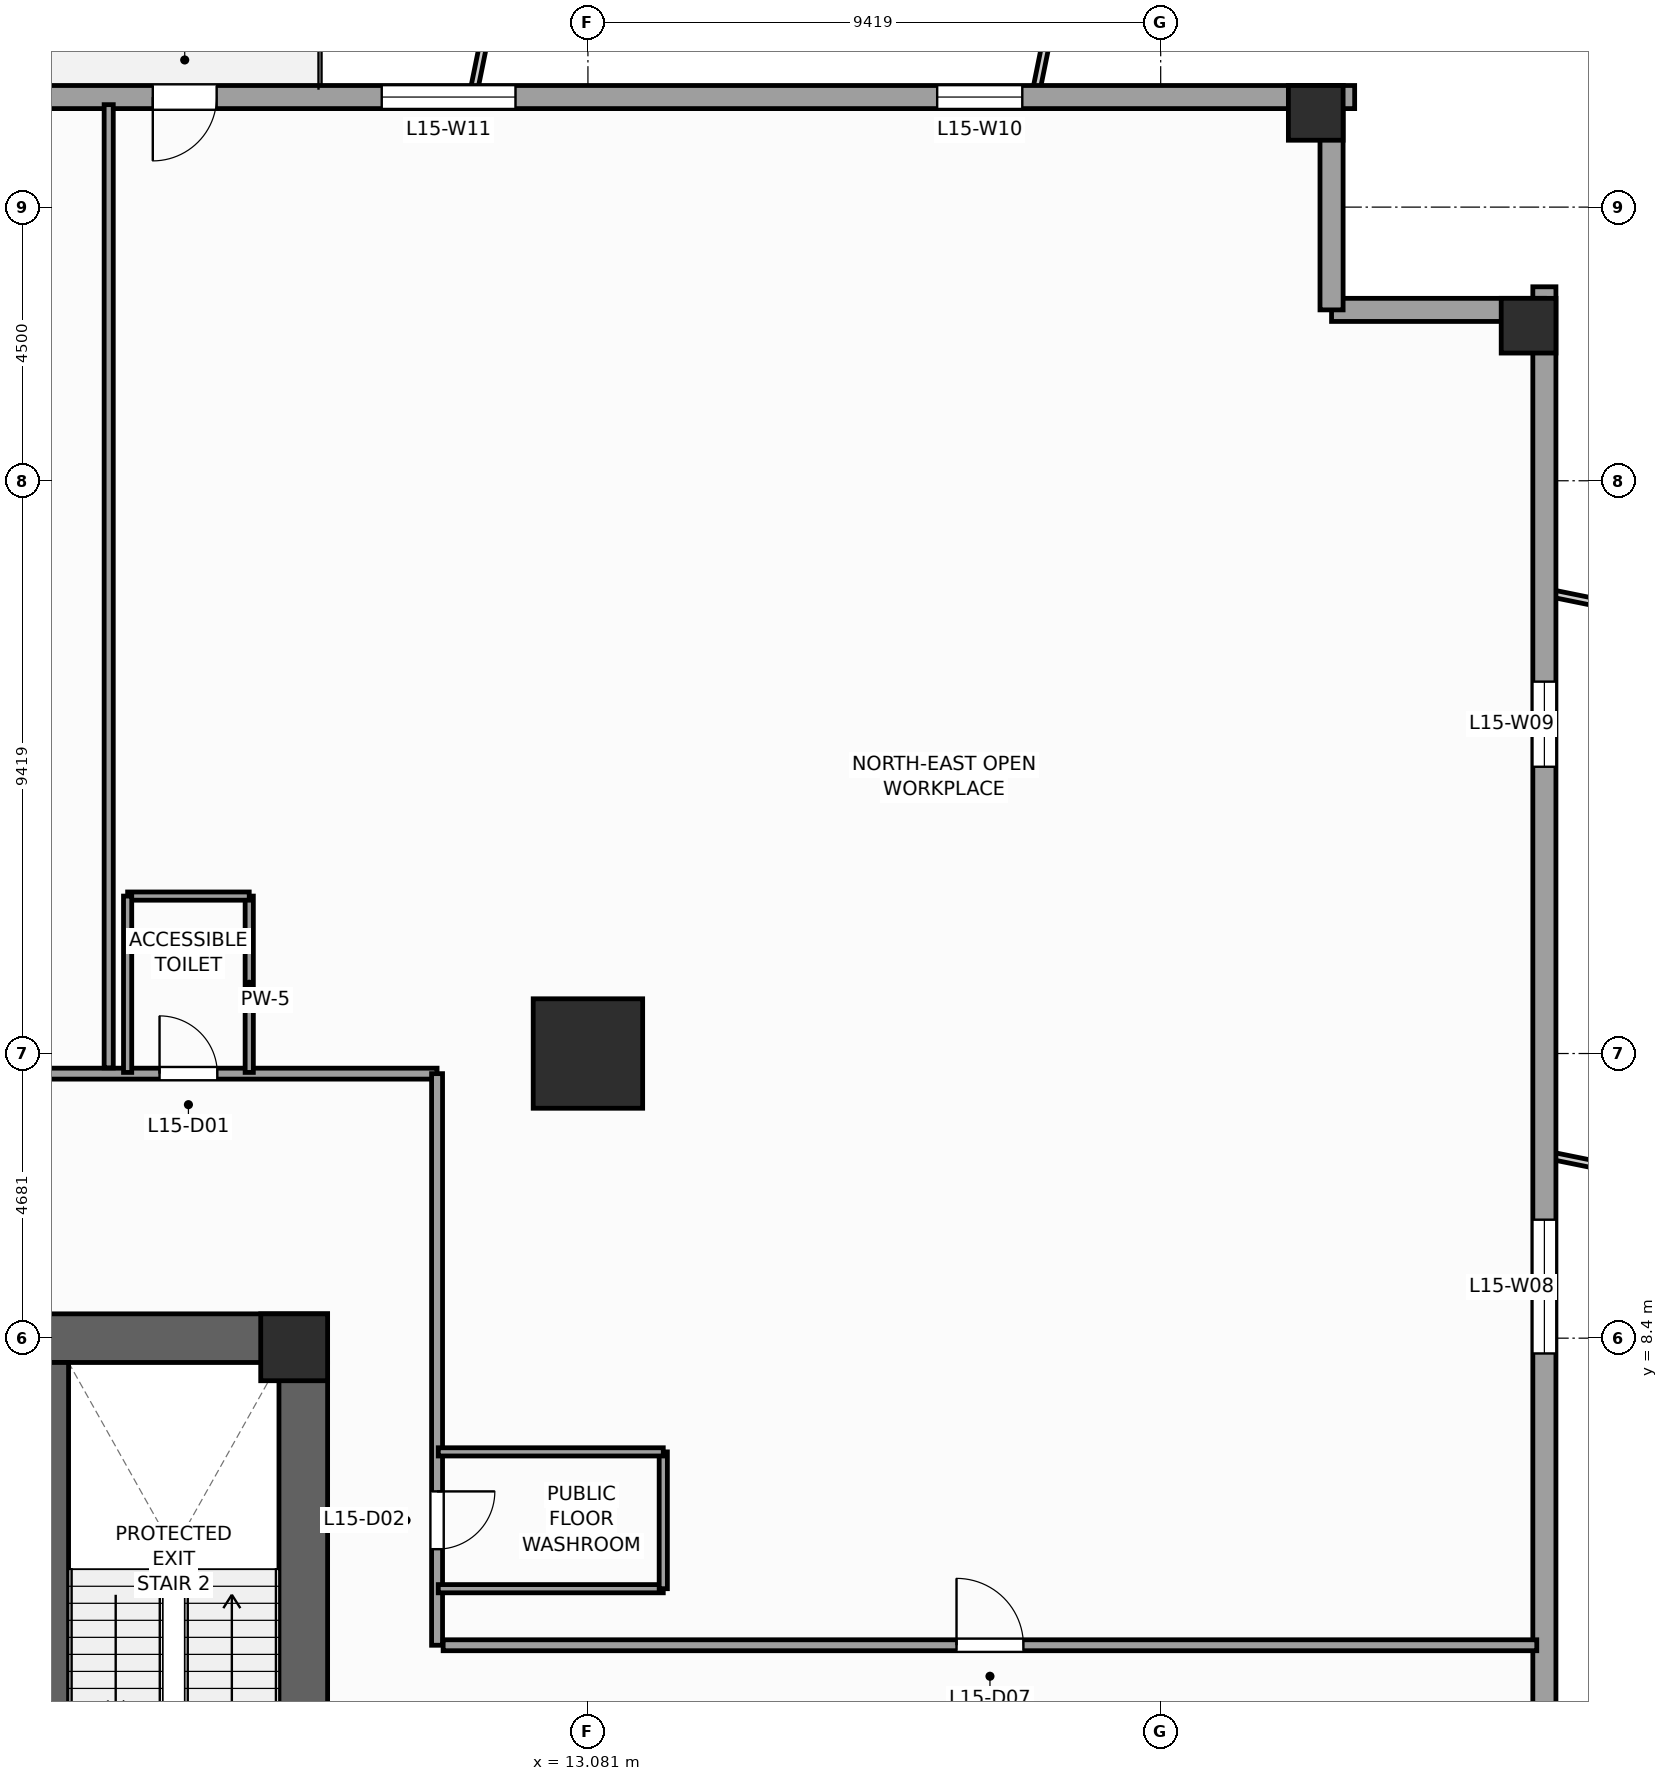
"""IFC4 building model, lengths in metres.
Left out: names, types, materials, properties, quantities, classifications, styles, units other than length and angle.
Written with IfcOpenShell. Run it as: python <this file> out.ifc"""

import sys

from ifc_helpers import new_model, si_unit, direction, frame, frame_2d, origin, origin_2d, place, context, subcontext, project, spatial, rectangle, extrude, source, transform, mapped, element, fill, save


model = new_model("IFC4")
c1 = context("Model", 3, precision=1e-05, world=origin(), true_north=direction((0.0, 1.0)))
c2 = subcontext(c1, "Body", "Model", "MODEL_VIEW")
j1 = project(units=[si_unit("LENGTHUNIT", "METRE"), si_unit("PLANEANGLEUNIT", "RADIAN")], contexts=[c1])
p1 = place(None, origin())
s1 = spatial("IfcSite", under=j1, at=p1, CompositionType="ELEMENT")
p2 = place(p1, origin())
s2 = spatial("IfcBuilding", under=s1, at=p2, CompositionType="ELEMENT")
p3 = place(p2, frame((0.0, 0.0, 66.0)))
s3 = spatial("IfcBuildingStorey", under=s2, at=p3, CompositionType="ELEMENT", Elevation=66.0)
p4 = place(p3, frame((-8.8, 8.4, 0.0), z_axis=(0.0, 0.0, 1.0), x_axis=(1.0, 0.0, 0.0)))
e1 = element("IfcWall", 1, at=p4, inside=s3, PredefinedType="SHEAR", context=c2, shape_type="SweptSolid", body=[
    extrude(rectangle(XDim=17.6, YDim=0.8, at=frame_2d((8.8, 0.0))), origin(), (0.0, 0.0, 1.0), 4.0),
])
p5 = place(p3, frame((8.4, -8.0, 0.0), z_axis=(0.0, 0.0, 1.0), x_axis=(0.0, 1.0, 0.0)))
e2 = element("IfcWall", 2, at=p5, inside=s3, PredefinedType="SHEAR", context=c2, shape_type="SweptSolid", body=[
    extrude(rectangle(XDim=16.0, YDim=0.8, at=frame_2d((8.0, 0.0))), origin(), (0.0, 0.0, 1.0), 4.0),
])
p6 = place(p5, frame((4.69, 0.0, 0.0)))
e3 = element("IfcOpeningElement", 3, at=p6, cuts=e2, PredefinedType="OPENING", context=c2, shape_type="SweptSolid", body=[
    extrude(rectangle(XDim=1.3, YDim=2.2, at=frame_2d((0.65, 1.1))), frame((0.0, 0.41, 0.0), z_axis=(0.0, -1.0, 0.0), x_axis=(1.0, 0.0, 0.0)), (0.0, 0.0, 1.0), 0.82),
])
p7 = place(p3, frame((4.36, -8.0, 0.0), z_axis=(0.0, 0.0, 1.0), x_axis=(0.0, 1.0, 0.0)))
e4 = element("IfcWall", 4, at=p7, inside=s3, PredefinedType="SHEAR", context=c2, shape_type="SweptSolid", body=[
    extrude(rectangle(XDim=16.0, YDim=0.36, at=frame_2d((8.0, 0.0))), origin(), (0.0, 0.0, 1.0), 4.0),
])
m1 = source(origin(), c2, "Body", "SweptSolid", [
    extrude(rectangle(XDim=1.1, YDim=1.1, at=origin_2d()), origin(), (0.0, 0.0, 1.0), 4.0),
])
p8 = place(p3, frame((8.25, 8.25, 0.0), z_axis=(0.0, 0.0, 1.0), x_axis=(1.0, 0.0, 0.0)))
e5 = element("IfcColumn", 5, at=p8, inside=s3, PredefinedType="PILASTER", context=c2, shape_type="MappedRepresentation", body=[
    mapped(m1, transform((0.0, 0.0, 0.0), scale=1.0)),
])
m2 = source(origin(), c2, "Body", "SweptSolid", [
    extrude(rectangle(XDim=1.8, YDim=1.8, at=origin_2d()), origin(), (0.0, 0.0, 1.0), 4.0),
])
p9 = place(p3, frame((13.081, 13.081, 0.0), z_axis=(0.0, 0.0, 1.0), x_axis=(1.0, 0.0, 0.0)))
e6 = element("IfcColumn", 6, at=p9, inside=s3, PredefinedType="COLUMN", context=c2, shape_type="MappedRepresentation", body=[
    mapped(m2, transform((0.0, 0.0, 0.0), scale=1.0)),
])
m3 = source(origin(), c2, "Body", "SweptSolid", [
    extrude(rectangle(XDim=0.9, YDim=0.9, at=origin_2d()), origin(), (0.0, 0.0, 1.0), 4.0),
])
for number, where, z_axis, x_axis in (
    (7, (28.55, 25.05, 0.0), (0.0, 0.0, 1.0), (1.0, 0.0, 0.0)),
    (8, (25.05, 28.55, 0.0), (0.0, 0.0, 1.0), (1.0, 0.0, 0.0)),
):
    element("IfcColumn", number, at=place(p3, frame(where, z_axis=z_axis, x_axis=x_axis)), inside=s3, PredefinedType="COLUMN", context=c2, shape_type="MappedRepresentation", body=[
        mapped(m3, transform((0.0, 0.0, 0.0), scale=1.0)),
    ])
p10 = place(p3, frame((28.81, -25.69, 0.0), z_axis=(0.0, 0.0, 1.0), x_axis=(0.0, 1.0, 0.0)))
e9 = element("IfcWall", 9, at=p10, inside=s3, PredefinedType="STANDARD", context=c2, shape_type="SweptSolid", body=[
    extrude(rectangle(XDim=51.38, YDim=0.38, at=frame_2d((25.69, 0.0))), origin(), (0.0, 0.0, 1.0), 3.12),
])
p11 = place(p10, frame((5.466, 0.0, 0.49)))
e10 = element("IfcOpeningElement", 10, at=p11, cuts=e9, PredefinedType="OPENING", context=c2, shape_type="SweptSolid", body=[
    extrude(rectangle(XDim=1.4, YDim=2.4, at=frame_2d((0.7, 1.2))), frame((0.0, 0.2, 0.0), z_axis=(0.0, -1.0, 0.0), x_axis=(1.0, 0.0, 0.0)), (0.0, 0.0, 1.0), 0.4),
])
p12 = place(p10, frame((13.8, 0.0, 0.49)))
e11 = element("IfcOpeningElement", 11, at=p12, cuts=e9, PredefinedType="OPENING", context=c2, shape_type="SweptSolid", body=[
    extrude(rectangle(XDim=2.2, YDim=2.4, at=frame_2d((1.1, 1.2))), frame((0.0, 0.2, 0.0), z_axis=(0.0, -1.0, 0.0), x_axis=(1.0, 0.0, 0.0)), (0.0, 0.0, 1.0), 0.4),
])
p13 = place(p10, frame((22.062, 0.0, 0.49)))
e12 = element("IfcOpeningElement", 12, at=p13, cuts=e9, PredefinedType="OPENING", context=c2, shape_type="SweptSolid", body=[
    extrude(rectangle(XDim=2.2, YDim=2.4, at=frame_2d((1.1, 1.2))), frame((0.0, 0.2, 0.0), z_axis=(0.0, -1.0, 0.0), x_axis=(1.0, 0.0, 0.0)), (0.0, 0.0, 1.0), 0.4),
])
p14 = place(p10, frame((33.838, 0.0, 0.49)))
e13 = element("IfcOpeningElement", 13, at=p14, cuts=e9, PredefinedType="OPENING", context=c2, shape_type="SweptSolid", body=[
    extrude(rectangle(XDim=2.2, YDim=2.4, at=frame_2d((1.1, 1.2))), frame((0.0, 0.2, 0.0), z_axis=(0.0, -1.0, 0.0), x_axis=(1.0, 0.0, 0.0)), (0.0, 0.0, 1.0), 0.4),
])
p15 = place(p10, frame((43.487, 0.0, 0.49)))
e14 = element("IfcOpeningElement", 14, at=p15, cuts=e9, PredefinedType="OPENING", context=c2, shape_type="SweptSolid", body=[
    extrude(rectangle(XDim=1.4, YDim=2.4, at=frame_2d((0.7, 1.2))), frame((0.0, 0.2, 0.0), z_axis=(0.0, -1.0, 0.0), x_axis=(1.0, 0.0, 0.0)), (0.0, 0.0, 1.0), 0.4),
])
p16 = place(p3, frame((28.81, 25.31, 0.0), z_axis=(0.0, 0.0, 1.0), x_axis=(-1.0, 0.0, 0.0)))
e15 = element("IfcWall", 15, at=p16, inside=s3, PredefinedType="STANDARD", context=c2, shape_type="SweptSolid", body=[
    extrude(rectangle(XDim=3.5, YDim=0.38, at=frame_2d((1.75, 0.0))), origin(), (0.0, 0.0, 1.0), 3.72),
])
p17 = place(p3, frame((25.31, 25.31, 0.0), z_axis=(0.0, 0.0, 1.0), x_axis=(0.0, 1.0, 0.0)))
e16 = element("IfcWall", 16, at=p17, inside=s3, PredefinedType="STANDARD", context=c2, shape_type="SweptSolid", body=[
    extrude(rectangle(XDim=3.69, YDim=0.38, at=frame_2d((1.845, 0.0))), origin(), (0.0, 0.0, 1.0), 3.72),
])
p18 = place(p3, frame((25.69, 28.81, 0.0), z_axis=(0.0, 0.0, 1.0), x_axis=(-1.0, 0.0, 0.0)))
e17 = element("IfcWall", 17, at=p18, inside=s3, PredefinedType="STANDARD", context=c2, shape_type="SweptSolid", body=[
    extrude(rectangle(XDim=51.38, YDim=0.38, at=frame_2d((25.69, 0.0))), origin(), (0.0, 0.0, 1.0), 3.12),
])
p19 = place(p18, frame((18.715, 0.0, 0.0)))
e18 = element("IfcOpeningElement", 18, at=p19, cuts=e17, PredefinedType="OPENING", context=c2, shape_type="SweptSolid", body=[
    extrude(rectangle(XDim=1.05, YDim=2.25, at=frame_2d((0.525, 1.125))), frame((0.0, 0.2, 0.0), z_axis=(0.0, -1.0, 0.0), x_axis=(1.0, 0.0, 0.0)), (0.0, 0.0, 1.0), 0.4),
])
p20 = place(p18, frame((5.466, 0.0, 0.49)))
e19 = element("IfcOpeningElement", 19, at=p20, cuts=e17, PredefinedType="OPENING", context=c2, shape_type="SweptSolid", body=[
    extrude(rectangle(XDim=1.4, YDim=2.4, at=frame_2d((0.7, 1.2))), frame((0.0, 0.2, 0.0), z_axis=(0.0, -1.0, 0.0), x_axis=(1.0, 0.0, 0.0)), (0.0, 0.0, 1.0), 0.4),
])
p21 = place(p18, frame((13.8, 0.0, 0.49)))
e20 = element("IfcOpeningElement", 20, at=p21, cuts=e17, PredefinedType="OPENING", context=c2, shape_type="SweptSolid", body=[
    extrude(rectangle(XDim=2.2, YDim=2.4, at=frame_2d((1.1, 1.2))), frame((0.0, 0.2, 0.0), z_axis=(0.0, -1.0, 0.0), x_axis=(1.0, 0.0, 0.0)), (0.0, 0.0, 1.0), 0.4),
])
p22 = place(p18, frame((22.062, 0.0, 0.49)))
e21 = element("IfcOpeningElement", 21, at=p22, cuts=e17, PredefinedType="OPENING", context=c2, shape_type="SweptSolid", body=[
    extrude(rectangle(XDim=2.2, YDim=2.4, at=frame_2d((1.1, 1.2))), frame((0.0, 0.2, 0.0), z_axis=(0.0, -1.0, 0.0), x_axis=(1.0, 0.0, 0.0)), (0.0, 0.0, 1.0), 0.4),
])
p23 = place(p18, frame((33.838, 0.0, 0.49)))
e22 = element("IfcOpeningElement", 22, at=p23, cuts=e17, PredefinedType="OPENING", context=c2, shape_type="SweptSolid", body=[
    extrude(rectangle(XDim=2.2, YDim=2.4, at=frame_2d((1.1, 1.2))), frame((0.0, 0.2, 0.0), z_axis=(0.0, -1.0, 0.0), x_axis=(1.0, 0.0, 0.0)), (0.0, 0.0, 1.0), 0.4),
])
p24 = place(p18, frame((43.487, 0.0, 0.49)))
e23 = element("IfcOpeningElement", 23, at=p24, cuts=e17, PredefinedType="OPENING", context=c2, shape_type="SweptSolid", body=[
    extrude(rectangle(XDim=1.4, YDim=2.4, at=frame_2d((0.7, 1.2))), frame((0.0, 0.2, 0.0), z_axis=(0.0, -1.0, 0.0), x_axis=(1.0, 0.0, 0.0)), (0.0, 0.0, 1.0), 0.4),
])
p25 = place(p3, frame((-10.6, 12.75, 0.0), z_axis=(0.0, 0.0, 1.0), x_axis=(1.0, 0.0, 0.0)))
e24 = element("IfcWall", 24, at=p25, inside=s3, PredefinedType="PARTITIONING", context=c2, shape_type="SweptSolid", body=[
    extrude(rectangle(XDim=21.2, YDim=0.18, at=frame_2d((10.6, 0.0))), origin(), (0.0, 0.0, 1.0), 3.72),
])
p26 = place(p25, frame((16.636, 0.0, 0.0)))
e25 = element("IfcOpeningElement", 25, at=p26, cuts=e24, PredefinedType="OPENING", context=c2, shape_type="SweptSolid", body=[
    extrude(rectangle(XDim=0.95, YDim=2.1, at=frame_2d((0.475, 1.05))), frame((0.0, 0.1, 0.0), z_axis=(0.0, -1.0, 0.0), x_axis=(1.0, 0.0, 0.0)), (0.0, 0.0, 1.0), 0.2),
])
p27 = place(p25, frame((3.314, 0.0, 0.0)))
e26 = element("IfcOpeningElement", 26, at=p27, cuts=e24, PredefinedType="OPENING", context=c2, shape_type="SweptSolid", body=[
    extrude(rectangle(XDim=1.1, YDim=2.2, at=frame_2d((0.55, 1.1))), frame((0.0, 0.1, 0.0), z_axis=(0.0, -1.0, 0.0), x_axis=(1.0, 0.0, 0.0)), (0.0, 0.0, 1.0), 0.2),
])
p28 = place(p25, frame((11.05, 0.0, 0.0)))
e27 = element("IfcOpeningElement", 27, at=p28, cuts=e24, PredefinedType="OPENING", context=c2, shape_type="SweptSolid", body=[
    extrude(rectangle(XDim=1.1, YDim=2.2, at=frame_2d((0.55, 1.1))), frame((0.0, 0.1, 0.0), z_axis=(0.0, -1.0, 0.0), x_axis=(1.0, 0.0, 0.0)), (0.0, 0.0, 1.0), 0.2),
])
p29 = place(p3, frame((10.6, 3.35, 0.0), z_axis=(0.0, 0.0, 1.0), x_axis=(0.0, 1.0, 0.0)))
e28 = element("IfcWall", 28, at=p29, inside=s3, PredefinedType="PARTITIONING", context=c2, shape_type="SweptSolid", body=[
    extrude(rectangle(XDim=9.4, YDim=0.18, at=frame_2d((4.7, 0.0))), origin(), (0.0, 0.0, 1.0), 3.72),
])
p30 = place(p29, frame((1.58, 0.0, 0.0)))
e29 = element("IfcOpeningElement", 29, at=p30, cuts=e28, PredefinedType="OPENING", context=c2, shape_type="SweptSolid", body=[
    extrude(rectangle(XDim=0.95, YDim=2.1, at=frame_2d((0.475, 1.05))), frame((0.0, 0.1, 0.0), z_axis=(0.0, -1.0, 0.0), x_axis=(1.0, 0.0, 0.0)), (0.0, 0.0, 1.0), 0.2),
])
p31 = place(p3, frame((10.7, 3.35, 0.0), z_axis=(0.0, 0.0, 1.0), x_axis=(1.0, 0.0, 0.0)))
e30 = element("IfcWall", 30, at=p31, inside=s3, PredefinedType="PARTITIONING", context=c2, shape_type="SweptSolid", body=[
    extrude(rectangle(XDim=17.985, YDim=0.18, at=frame_2d((8.993, 0.0))), origin(), (0.0, 0.0, 1.0), 3.72),
])
p32 = place(p31, frame((8.442, 0.0, 0.0)))
e31 = element("IfcOpeningElement", 31, at=p32, cuts=e30, PredefinedType="OPENING", context=c2, shape_type="SweptSolid", body=[
    extrude(rectangle(XDim=1.1, YDim=2.2, at=frame_2d((0.55, 1.1))), frame((0.0, 0.1, 0.0), z_axis=(0.0, -1.0, 0.0), x_axis=(1.0, 0.0, 0.0)), (0.0, 0.0, 1.0), 0.2),
])
p33 = place(p3, frame((5.2, 12.845, 0.0), z_axis=(0.0, 0.0, 1.0), x_axis=(0.0, 1.0, 0.0)))
e32 = element("IfcWall", 32, at=p33, inside=s3, PredefinedType="PARTITIONING", context=c2, shape_type="SweptSolid", body=[
    extrude(rectangle(XDim=15.84, YDim=0.15, at=frame_2d((7.92, 0.0))), origin(), (0.0, 0.0, 1.0), 3.72),
])
p34 = place(p3, frame((7.511, 12.77, 0.0), z_axis=(0.0, 0.0, 1.0), x_axis=(0.0, 1.0, 0.0)))
e33 = element("IfcWall", 33, at=p34, inside=s3, PredefinedType="PARTITIONING", context=c2, shape_type="SweptSolid", body=[
    extrude(rectangle(XDim=2.9, YDim=0.135, at=frame_2d((1.45, 0.0))), origin(), (0.0, 0.0, 1.0), 3.72),
])
p35 = place(p3, frame((5.511, 15.67, 0.0), z_axis=(0.0, 0.0, 1.0), x_axis=(1.0, 0.0, 0.0)))
e34 = element("IfcWall", 34, at=p35, inside=s3, PredefinedType="PARTITIONING", context=c2, shape_type="SweptSolid", body=[
    extrude(rectangle(XDim=2.0, YDim=0.135, at=frame_2d((1.0, 0.0))), origin(), (0.0, 0.0, 1.0), 3.22),
])
p36 = place(p3, frame((5.511, 12.77, 0.0), z_axis=(0.0, 0.0, 1.0), x_axis=(0.0, 1.0, 0.0)))
e35 = element("IfcWall", 35, at=p36, inside=s3, PredefinedType="PARTITIONING", context=c2, shape_type="SweptSolid", body=[
    extrude(rectangle(XDim=2.9, YDim=0.135, at=frame_2d((1.45, 0.0))), origin(), (0.0, 0.0, 1.0), 3.72),
])
p37 = place(p3, frame((10.62, 4.28, 0.0), z_axis=(0.0, 0.0, 1.0), x_axis=(1.0, 0.0, 0.0)))
e36 = element("IfcWall", 36, at=p37, inside=s3, PredefinedType="PARTITIONING", context=c2, shape_type="SweptSolid", body=[
    extrude(rectangle(XDim=3.7, YDim=0.135, at=frame_2d((1.85, 0.0))), origin(), (0.0, 0.0, 1.0), 3.72),
])
p38 = place(p3, frame((14.32, 4.28, 0.0), z_axis=(0.0, 0.0, 1.0), x_axis=(0.0, 1.0, 0.0)))
e37 = element("IfcWall", 37, at=p38, inside=s3, PredefinedType="PARTITIONING", context=c2, shape_type="SweptSolid", body=[
    extrude(rectangle(XDim=2.25, YDim=0.135, at=frame_2d((1.125, 0.0))), origin(), (0.0, 0.0, 1.0), 3.72),
])
p39 = place(p3, frame((10.62, 6.53, 0.0), z_axis=(0.0, 0.0, 1.0), x_axis=(1.0, 0.0, 0.0)))
e38 = element("IfcWall", 38, at=p39, inside=s3, PredefinedType="PARTITIONING", context=c2, shape_type="SweptSolid", body=[
    extrude(rectangle(XDim=3.7, YDim=0.135, at=frame_2d((1.85, 0.0))), origin(), (0.0, 0.0, 1.0), 3.72),
])
m4 = source(origin(), c2, "Body", "SweptSolid", [
    extrude(rectangle(XDim=2.2, YDim=2.4, at=frame_2d((1.1, 1.2))), frame((0.0, 0.03, 0.0), z_axis=(0.0, -1.0, 0.0), x_axis=(1.0, 0.0, 0.0)), (0.0, 0.0, 1.0), 0.06),
])
p40 = place(p14, origin())
e39 = element("IfcWindow", 39, at=p40, inside=s3, PartitioningType="SINGLE_PANEL", PredefinedType="WINDOW", context=c2, shape_type="MappedRepresentation", body=[
    mapped(m4, transform((0.0, 0.0, 0.0), scale=1.0)),
])
fill(e13, e39)
m5 = source(origin(), c2, "Body", "SweptSolid", [
    extrude(rectangle(XDim=1.4, YDim=2.4, at=frame_2d((0.7, 1.2))), frame((0.0, 0.03, 0.0), z_axis=(0.0, -1.0, 0.0), x_axis=(1.0, 0.0, 0.0)), (0.0, 0.0, 1.0), 0.06),
])
p41 = place(p15, origin())
e40 = element("IfcWindow", 40, at=p41, inside=s3, PartitioningType="SINGLE_PANEL", PredefinedType="WINDOW", context=c2, shape_type="MappedRepresentation", body=[
    mapped(m5, transform((0.0, 0.0, 0.0), scale=1.0)),
])
fill(e14, e40)
m6 = source(origin(), c2, "Body", "SweptSolid", [
    extrude(rectangle(XDim=1.05, YDim=2.25, at=frame_2d((0.525, 1.125))), frame((0.0, 0.025, 0.0), z_axis=(0.0, -1.0, 0.0), x_axis=(1.0, 0.0, 0.0)), (0.0, 0.0, 1.0), 0.05),
])
p42 = place(p19, origin())
e41 = element("IfcDoor", 41, at=p42, inside=s3, OperationType="SINGLE_SWING_RIGHT", PredefinedType="DOOR", context=c2, shape_type="MappedRepresentation", body=[
    mapped(m6, transform((0.0, 0.0, 0.0), scale=1.0)),
])
fill(e18, e41)
p43 = place(p20, origin())
e42 = element("IfcWindow", 42, at=p43, inside=s3, PartitioningType="SINGLE_PANEL", PredefinedType="WINDOW", context=c2, shape_type="MappedRepresentation", body=[
    mapped(m5, transform((0.0, 0.0, 0.0), scale=1.0)),
])
fill(e19, e42)
p44 = place(p21, origin())
e43 = element("IfcWindow", 43, at=p44, inside=s3, PartitioningType="SINGLE_PANEL", PredefinedType="WINDOW", context=c2, shape_type="MappedRepresentation", body=[
    mapped(m4, transform((0.0, 0.0, 0.0), scale=1.0)),
])
fill(e20, e43)
m7 = source(origin(), c2, "Body", "SweptSolid", [
    extrude(rectangle(XDim=0.95, YDim=2.1, at=frame_2d((0.475, 1.05))), frame((0.0, 0.025, 0.0), z_axis=(0.0, -1.0, 0.0), x_axis=(1.0, 0.0, 0.0)), (0.0, 0.0, 1.0), 0.05),
])
p45 = place(p26, origin())
e44 = element("IfcDoor", 44, at=p45, inside=s3, OperationType="SINGLE_SWING_LEFT", PredefinedType="DOOR", context=c2, shape_type="MappedRepresentation", body=[
    mapped(m7, transform((0.0, 0.0, 0.0), scale=1.0)),
])
fill(e25, e44)
p46 = place(p30, frame((0.95, 0.0, 0.0), z_axis=(0.0, 0.0, 1.0), x_axis=(-1.0, 0.0, 0.0)))
e45 = element("IfcDoor", 45, at=p46, inside=s3, OperationType="SINGLE_SWING_RIGHT", PredefinedType="DOOR", context=c2, shape_type="MappedRepresentation", body=[
    mapped(m7, transform((0.0, 0.0, 0.0), scale=1.0)),
])
fill(e29, e45)
m8 = source(origin(), c2, "Body", "SweptSolid", [
    extrude(rectangle(XDim=1.1, YDim=2.2, at=frame_2d((0.55, 1.1))), frame((0.0, 0.025, 0.0), z_axis=(0.0, -1.0, 0.0), x_axis=(1.0, 0.0, 0.0)), (0.0, 0.0, 1.0), 0.05),
])
p47 = place(p32, origin())
e46 = element("IfcDoor", 46, at=p47, inside=s3, OperationType="SINGLE_SWING_LEFT", PredefinedType="DOOR", context=c2, shape_type="MappedRepresentation", body=[
    mapped(m8, transform((0.0, 0.0, 0.0), scale=1.0)),
])
fill(e31, e46)
save(model, sys.argv[1])
